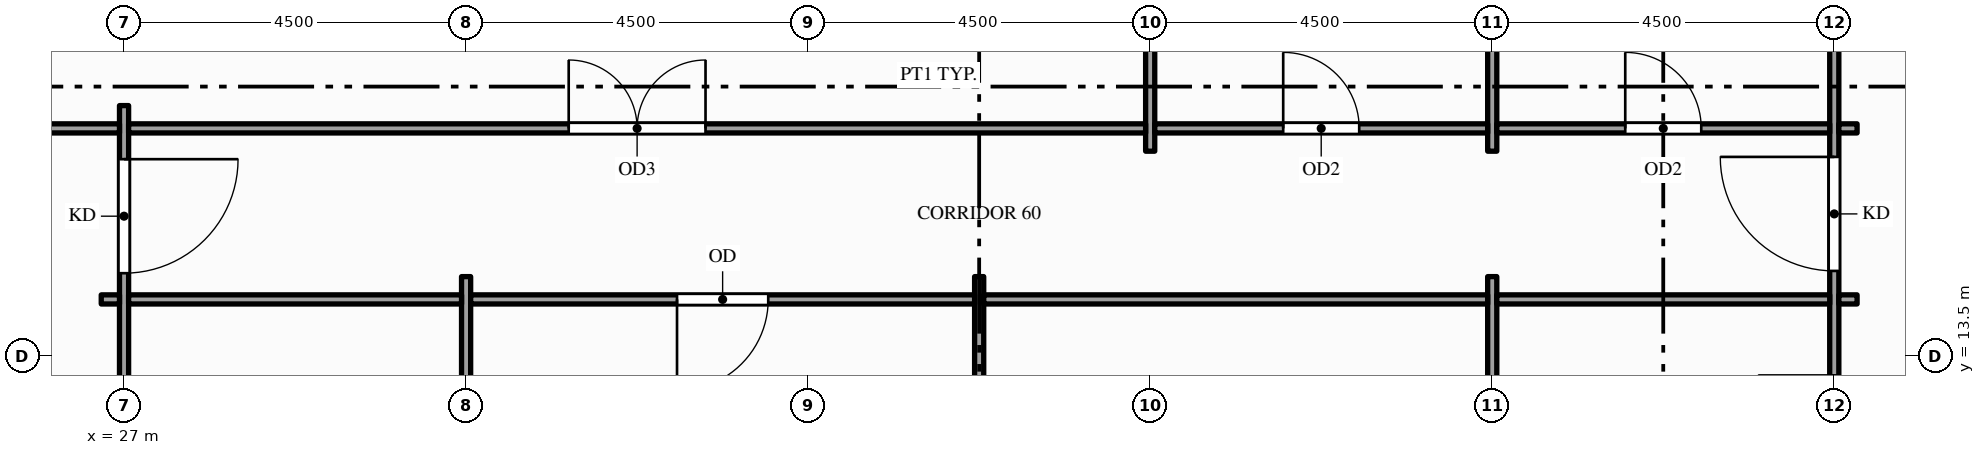
"""IFC4 building model, lengths in metres.
Left out: names, types, materials, properties, quantities, classifications, styles, units other than length and angle.
Written with IfcOpenShell. Run it as: python <this file> out.ifc"""

import sys

from ifc_helpers import new_model, si_unit, direction, frame, frame_2d, origin, place, context, subcontext, project, spatial, rectangle, extrude, element, fill, save


model = new_model("IFC4")
c1 = context("Model", 3, precision=1e-05, world=origin(), true_north=direction((0.0, 1.0)))
c2 = subcontext(c1, "Body", "Model", "MODEL_VIEW")
j1 = project(units=[si_unit("LENGTHUNIT", "METRE"), si_unit("PLANEANGLEUNIT", "RADIAN")], contexts=[c1])
p1 = place(None, origin())
s1 = spatial("IfcSite", under=j1, at=p1, CompositionType="ELEMENT")
p2 = place(p1, origin())
s2 = spatial("IfcBuilding", under=s1, at=p2, CompositionType="ELEMENT")
p3 = place(p2, frame((0.0, 0.0, 215.0)))
s3 = spatial("IfcBuildingStorey", under=s2, at=p3, CompositionType="ELEMENT", Elevation=215.0)
p4 = place(p3, frame((27.0, 2.7, 0.0), z_axis=(0.0, 0.0, 1.0), x_axis=(0.0, 1.0, 0.0)))
e1 = element("IfcWall", 1, at=p4, inside=s3, PredefinedType="PARTITIONING", context=c2, shape_type="SweptSolid", body=[
    extrude(rectangle(XDim=14.1, YDim=0.12, at=frame_2d((7.05, 0.0))), origin(), (0.0, 0.0, 1.0), 2.87),
])
p5 = place(p4, frame((0.705, 0.0, 0.0)))
e2 = element("IfcOpeningElement", 2, at=p5, cuts=e1, PredefinedType="OPENING", context=c2, shape_type="SweptSolid", body=[
    extrude(rectangle(XDim=1.5, YDim=2.1, at=frame_2d((0.75, 1.05))), frame((0.0, 0.07, 0.0), z_axis=(0.0, -1.0, 0.0), x_axis=(1.0, 0.0, 0.0)), (0.0, 0.0, 1.0), 0.14),
])
p6 = place(p4, frame((11.895, 0.0, 0.0)))
e3 = element("IfcOpeningElement", 3, at=p6, cuts=e1, PredefinedType="OPENING", context=c2, shape_type="SweptSolid", body=[
    extrude(rectangle(XDim=1.5, YDim=2.1, at=frame_2d((0.75, 1.05))), frame((0.0, 0.07, 0.0), z_axis=(0.0, -1.0, 0.0), x_axis=(1.0, 0.0, 0.0)), (0.0, 0.0, 1.0), 0.14),
])
for number, where, z_axis, x_axis in (
    (4, (31.5, 4.95, 0.0), (0.0, 0.0, 1.0), (0.0, 1.0, 0.0)),
    (5, (38.25, 4.95, 0.0), (0.0, 0.0, 1.0), (0.0, 1.0, 0.0)),
):
    element("IfcWall", number, at=place(p3, frame(where, z_axis=z_axis, x_axis=x_axis)), inside=s3, PredefinedType="PARTITIONING", context=c2, shape_type="SweptSolid", body=[
        extrude(rectangle(XDim=9.6, YDim=0.12, at=frame_2d((4.8, 0.0))), origin(), (0.0, 0.0, 1.0), 2.87),
    ])
p7 = place(p3, frame((40.5, 16.2, 0.0), z_axis=(0.0, 0.0, 1.0), x_axis=(0.0, 1.0, 0.0)))
e6 = element("IfcWall", 6, at=p7, inside=s3, PredefinedType="PARTITIONING", context=c2, shape_type="SweptSolid", body=[
    extrude(rectangle(XDim=4.65, YDim=0.12, at=frame_2d((2.325, 0.0))), origin(), (0.0, 0.0, 1.0), 2.87),
])
p8 = place(p3, frame((45.0, 4.95, 0.0), z_axis=(0.0, 0.0, 1.0), x_axis=(0.0, 1.0, 0.0)))
e7 = element("IfcWall", 7, at=p8, inside=s3, PredefinedType="PARTITIONING", context=c2, shape_type="SweptSolid", body=[
    extrude(rectangle(XDim=9.6, YDim=0.12, at=frame_2d((4.8, 0.0))), origin(), (0.0, 0.0, 1.0), 2.87),
])
p9 = place(p3, frame((45.0, 16.2, 0.0), z_axis=(0.0, 0.0, 1.0), x_axis=(0.0, 1.0, 0.0)))
e8 = element("IfcWall", 8, at=p9, inside=s3, PredefinedType="PARTITIONING", context=c2, shape_type="SweptSolid", body=[
    extrude(rectangle(XDim=4.65, YDim=0.12, at=frame_2d((2.325, 0.0))), origin(), (0.0, 0.0, 1.0), 2.87),
])
p10 = place(p3, frame((49.5, -1.35, 0.0), z_axis=(0.0, 0.0, 1.0), x_axis=(0.0, 1.0, 0.0)))
e9 = element("IfcWall", 9, at=p10, inside=s3, PredefinedType="PARTITIONING", context=c2, shape_type="SweptSolid", body=[
    extrude(rectangle(XDim=22.2, YDim=0.12, at=frame_2d((11.1, 0.0))), origin(), (0.0, 0.0, 1.0), 2.87),
])
p11 = place(p10, frame((4.725, 0.0, 0.0)))
e10 = element("IfcOpeningElement", 10, at=p11, cuts=e9, PredefinedType="OPENING", context=c2, shape_type="SweptSolid", body=[
    extrude(rectangle(XDim=1.5, YDim=2.1, at=frame_2d((0.75, 1.05))), frame((0.0, 0.07, 0.0), z_axis=(0.0, -1.0, 0.0), x_axis=(1.0, 0.0, 0.0)), (0.0, 0.0, 1.0), 0.14),
])
p12 = place(p10, frame((15.975, 0.0, 0.0)))
e11 = element("IfcOpeningElement", 11, at=p12, cuts=e9, PredefinedType="OPENING", context=c2, shape_type="SweptSolid", body=[
    extrude(rectangle(XDim=1.5, YDim=2.1, at=frame_2d((0.75, 1.05))), frame((0.0, 0.07, 0.0), z_axis=(0.0, -1.0, 0.0), x_axis=(1.0, 0.0, 0.0)), (0.0, 0.0, 1.0), 0.14),
])
p13 = place(p10, frame((7.6, 0.0, 0.0)))
e12 = element("IfcOpeningElement", 12, at=p13, cuts=e9, PredefinedType="OPENING", context=c2, shape_type="SweptSolid", body=[
    extrude(rectangle(XDim=0.9, YDim=2.1, at=frame_2d((0.45, 1.05))), frame((0.0, 0.07, 0.0), z_axis=(0.0, -1.0, 0.0), x_axis=(1.0, 0.0, 0.0)), (0.0, 0.0, 1.0), 0.14),
])
p14 = place(p10, frame((10.65, 0.0, 0.0)))
e13 = element("IfcOpeningElement", 13, at=p14, cuts=e9, PredefinedType="OPENING", context=c2, shape_type="SweptSolid", body=[
    extrude(rectangle(XDim=0.9, YDim=2.1, at=frame_2d((0.45, 1.05))), frame((0.0, 0.07, 0.0), z_axis=(0.0, -1.0, 0.0), x_axis=(1.0, 0.0, 0.0)), (0.0, 0.0, 1.0), 0.14),
])
p15 = place(p10, frame((13.6, 0.0, 0.0)))
e14 = element("IfcOpeningElement", 14, at=p15, cuts=e9, PredefinedType="OPENING", context=c2, shape_type="SweptSolid", body=[
    extrude(rectangle(XDim=1.0, YDim=2.1, at=frame_2d((0.5, 1.05))), frame((0.0, 0.07, 0.0), z_axis=(0.0, -1.0, 0.0), x_axis=(1.0, 0.0, 0.0)), (0.0, 0.0, 1.0), 0.14),
])
p16 = place(p3, frame((26.7, 14.25, 0.0), z_axis=(0.0, 0.0, 1.0), x_axis=(1.0, 0.0, 0.0)))
e15 = element("IfcWall", 15, at=p16, inside=s3, PredefinedType="PARTITIONING", context=c2, shape_type="SweptSolid", body=[
    extrude(rectangle(XDim=0.24, YDim=0.12, at=frame_2d((0.12, 0.0))), origin(), (0.0, 0.0, 1.0), 2.87),
])
p17 = place(p3, frame((27.06, 14.25, 0.0), z_axis=(0.0, 0.0, 1.0), x_axis=(1.0, 0.0, 0.0)))
e16 = element("IfcWall", 16, at=p17, inside=s3, PredefinedType="PARTITIONING", context=c2, shape_type="SweptSolid", body=[
    extrude(rectangle(XDim=4.38, YDim=0.12, at=frame_2d((2.19, 0.0))), origin(), (0.0, 0.0, 1.0), 2.87),
])
p18 = place(p3, frame((31.56, 14.25, 0.0), z_axis=(0.0, 0.0, 1.0), x_axis=(1.0, 0.0, 0.0)))
e17 = element("IfcWall", 17, at=p18, inside=s3, PredefinedType="PARTITIONING", context=c2, shape_type="SweptSolid", body=[
    extrude(rectangle(XDim=6.63, YDim=0.12, at=frame_2d((3.315, 0.0))), origin(), (0.0, 0.0, 1.0), 2.87),
])
p19 = place(p18, frame((2.715, 0.0, 0.0)))
e18 = element("IfcOpeningElement", 18, at=p19, cuts=e17, PredefinedType="OPENING", context=c2, shape_type="SweptSolid", body=[
    extrude(rectangle(XDim=1.2, YDim=2.1, at=frame_2d((0.6, 1.05))), frame((0.0, 0.07, 0.0), z_axis=(0.0, -1.0, 0.0), x_axis=(1.0, 0.0, 0.0)), (0.0, 0.0, 1.0), 0.14),
])
p20 = place(p3, frame((38.31, 14.25, 0.0), z_axis=(0.0, 0.0, 1.0), x_axis=(1.0, 0.0, 0.0)))
e19 = element("IfcWall", 19, at=p20, inside=s3, PredefinedType="PARTITIONING", context=c2, shape_type="SweptSolid", body=[
    extrude(rectangle(XDim=6.63, YDim=0.12, at=frame_2d((3.315, 0.0))), origin(), (0.0, 0.0, 1.0), 2.87),
])
p21 = place(p3, frame((45.06, 14.25, 0.0), z_axis=(0.0, 0.0, 1.0), x_axis=(1.0, 0.0, 0.0)))
e20 = element("IfcWall", 20, at=p21, inside=s3, PredefinedType="PARTITIONING", context=c2, shape_type="SweptSolid", body=[
    extrude(rectangle(XDim=4.38, YDim=0.12, at=frame_2d((2.19, 0.0))), origin(), (0.0, 0.0, 1.0), 2.87),
])
p22 = place(p3, frame((49.56, 14.25, 0.0), z_axis=(0.0, 0.0, 1.0), x_axis=(1.0, 0.0, 0.0)))
e21 = element("IfcWall", 21, at=p22, inside=s3, PredefinedType="PARTITIONING", context=c2, shape_type="SweptSolid", body=[
    extrude(rectangle(XDim=0.24, YDim=0.12, at=frame_2d((0.12, 0.0))), origin(), (0.0, 0.0, 1.0), 2.87),
])
p23 = place(p3, frame((24.81, 16.5, 0.0), z_axis=(0.0, 0.0, 1.0), x_axis=(1.0, 0.0, 0.0)))
e22 = element("IfcWall", 22, at=p23, inside=s3, PredefinedType="PARTITIONING", context=c2, shape_type="SweptSolid", body=[
    extrude(rectangle(XDim=2.13, YDim=0.12, at=frame_2d((1.065, 0.0))), origin(), (0.0, 0.0, 1.0), 2.76),
])
p24 = place(p3, frame((27.06, 16.5, 0.0), z_axis=(0.0, 0.0, 1.0), x_axis=(1.0, 0.0, 0.0)))
e23 = element("IfcWall", 23, at=p24, inside=s3, PredefinedType="PARTITIONING", context=c2, shape_type="SweptSolid", body=[
    extrude(rectangle(XDim=13.38, YDim=0.12, at=frame_2d((6.69, 0.0))), origin(), (0.0, 0.0, 1.0), 2.87),
])
p25 = place(p24, frame((5.79, 0.0, 0.0)))
e24 = element("IfcOpeningElement", 24, at=p25, cuts=e23, PredefinedType="OPENING", context=c2, shape_type="SweptSolid", body=[
    extrude(rectangle(XDim=1.8, YDim=2.1, at=frame_2d((0.9, 1.05))), frame((0.0, 0.07, 0.0), z_axis=(0.0, -1.0, 0.0), x_axis=(1.0, 0.0, 0.0)), (0.0, 0.0, 1.0), 0.14),
])
p26 = place(p3, frame((40.56, 16.5, 0.0), z_axis=(0.0, 0.0, 1.0), x_axis=(1.0, 0.0, 0.0)))
e25 = element("IfcWall", 25, at=p26, inside=s3, PredefinedType="PARTITIONING", context=c2, shape_type="SweptSolid", body=[
    extrude(rectangle(XDim=4.38, YDim=0.12, at=frame_2d((2.19, 0.0))), origin(), (0.0, 0.0, 1.0), 2.87),
])
p27 = place(p26, frame((1.69, 0.0, 0.0)))
e26 = element("IfcOpeningElement", 26, at=p27, cuts=e25, PredefinedType="OPENING", context=c2, shape_type="SweptSolid", body=[
    extrude(rectangle(XDim=1.0, YDim=2.1, at=frame_2d((0.5, 1.05))), frame((0.0, 0.07, 0.0), z_axis=(0.0, -1.0, 0.0), x_axis=(1.0, 0.0, 0.0)), (0.0, 0.0, 1.0), 0.14),
])
p28 = place(p3, frame((45.06, 16.5, 0.0), z_axis=(0.0, 0.0, 1.0), x_axis=(1.0, 0.0, 0.0)))
e27 = element("IfcWall", 27, at=p28, inside=s3, PredefinedType="PARTITIONING", context=c2, shape_type="SweptSolid", body=[
    extrude(rectangle(XDim=4.38, YDim=0.12, at=frame_2d((2.19, 0.0))), origin(), (0.0, 0.0, 1.0), 2.87),
])
p29 = place(p28, frame((1.69, 0.0, 0.0)))
e28 = element("IfcOpeningElement", 28, at=p29, cuts=e27, PredefinedType="OPENING", context=c2, shape_type="SweptSolid", body=[
    extrude(rectangle(XDim=1.0, YDim=2.1, at=frame_2d((0.5, 1.05))), frame((0.0, 0.07, 0.0), z_axis=(0.0, -1.0, 0.0), x_axis=(1.0, 0.0, 0.0)), (0.0, 0.0, 1.0), 0.14),
])
p30 = place(p3, frame((49.56, 16.5, 0.0), z_axis=(0.0, 0.0, 1.0), x_axis=(1.0, 0.0, 0.0)))
e29 = element("IfcWall", 29, at=p30, inside=s3, PredefinedType="PARTITIONING", context=c2, shape_type="SweptSolid", body=[
    extrude(rectangle(XDim=0.24, YDim=0.12, at=frame_2d((0.12, 0.0))), origin(), (0.0, 0.0, 1.0), 2.87),
])
p31 = place(p6, origin())
e30 = element("IfcDoor", 30, at=p31, inside=s3, OperationType="SINGLE_SWING_RIGHT", PredefinedType="DOOR", context=c2, shape_type="SweptSolid", body=[
    extrude(rectangle(XDim=1.5, YDim=2.1, at=frame_2d((0.75, 1.05))), frame((0.0, 0.025, 0.0), z_axis=(0.0, -1.0, 0.0), x_axis=(1.0, 0.0, 0.0)), (0.0, 0.0, 1.0), 0.05),
])
fill(e3, e30)
p32 = place(p12, origin())
e31 = element("IfcDoor", 31, at=p32, inside=s3, OperationType="SINGLE_SWING_RIGHT", PredefinedType="DOOR", context=c2, shape_type="SweptSolid", body=[
    extrude(rectangle(XDim=1.5, YDim=2.1, at=frame_2d((0.75, 1.05))), frame((0.0, 0.025, 0.0), z_axis=(0.0, -1.0, 0.0), x_axis=(1.0, 0.0, 0.0)), (0.0, 0.0, 1.0), 0.05),
])
fill(e11, e31)
p33 = place(p19, origin())
e32 = element("IfcDoor", 32, at=p33, inside=s3, OperationType="SINGLE_SWING_LEFT", PredefinedType="DOOR", context=c2, shape_type="SweptSolid", body=[
    extrude(rectangle(XDim=1.2, YDim=2.1, at=frame_2d((0.6, 1.05))), frame((0.0, 0.025, 0.0), z_axis=(0.0, -1.0, 0.0), x_axis=(1.0, 0.0, 0.0)), (0.0, 0.0, 1.0), 0.05),
])
fill(e18, e32)
p34 = place(p25, origin())
e33 = element("IfcDoor", 33, at=p34, inside=s3, OperationType="DOUBLE_DOOR_SINGLE_SWING", PredefinedType="DOOR", context=c2, shape_type="SweptSolid", body=[
    extrude(rectangle(XDim=1.8, YDim=2.1, at=frame_2d((0.9, 1.05))), frame((0.0, 0.025, 0.0), z_axis=(0.0, -1.0, 0.0), x_axis=(1.0, 0.0, 0.0)), (0.0, 0.0, 1.0), 0.05),
])
fill(e24, e33)
p35 = place(p27, origin())
e34 = element("IfcDoor", 34, at=p35, inside=s3, OperationType="SINGLE_SWING_LEFT", PredefinedType="DOOR", context=c2, shape_type="SweptSolid", body=[
    extrude(rectangle(XDim=1.0, YDim=2.1, at=frame_2d((0.5, 1.05))), frame((0.0, 0.025, 0.0), z_axis=(0.0, -1.0, 0.0), x_axis=(1.0, 0.0, 0.0)), (0.0, 0.0, 1.0), 0.05),
])
fill(e26, e34)
p36 = place(p29, origin())
e35 = element("IfcDoor", 35, at=p36, inside=s3, OperationType="SINGLE_SWING_LEFT", PredefinedType="DOOR", context=c2, shape_type="SweptSolid", body=[
    extrude(rectangle(XDim=1.0, YDim=2.1, at=frame_2d((0.5, 1.05))), frame((0.0, 0.025, 0.0), z_axis=(0.0, -1.0, 0.0), x_axis=(1.0, 0.0, 0.0)), (0.0, 0.0, 1.0), 0.05),
])
fill(e28, e35)
save(model, sys.argv[1])
